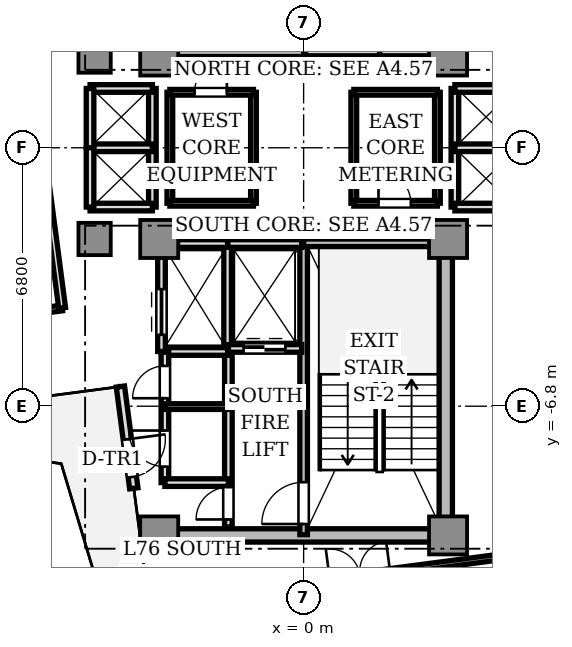
"""IFC4 building model, lengths in metres.
Left out: names, types, materials, properties, quantities, classifications, styles, units other than length and angle.
Written with IfcOpenShell. Run it as: python <this file> out.ifc"""

import sys

from ifc_helpers import new_model, si_unit, direction, frame, frame_2d, origin, origin_2d, place, context, subcontext, project, spatial, rectangle, extrude, source, transform, mapped, element, fill, save


model = new_model("IFC4")
c1 = context("Model", 3, precision=1e-05, world=origin(), true_north=direction((0.0, 1.0)))
c2 = subcontext(c1, "Body", "Model", "MODEL_VIEW")
j1 = project(units=[si_unit("LENGTHUNIT", "METRE"), si_unit("PLANEANGLEUNIT", "RADIAN")], contexts=[c1])
p1 = place(None, origin())
s1 = spatial("IfcSite", under=j1, at=p1, CompositionType="ELEMENT")
p2 = place(p1, origin())
s2 = spatial("IfcBuilding", under=s1, at=p2, CompositionType="ELEMENT")
p3 = place(p2, frame((0.0, 0.0, 272.45)))
s3 = spatial("IfcBuildingStorey", under=s2, at=p3, CompositionType="ELEMENT", Elevation=272.45)
p4 = place(p3, frame((-3.55, -10.2, 0.0), z_axis=(0.0, 0.0, 1.0), x_axis=(1.0, 0.0, 0.0)))
e1 = element("IfcWall", 1, at=p4, inside=s3, PredefinedType="SHEAR", context=c2, shape_type="SweptSolid", body=[
    extrude(rectangle(XDim=7.1, YDim=0.35, at=frame_2d((3.55, 0.0))), origin(), (0.0, 0.0, 1.0), 3.11),
])
p5 = place(p3, frame((3.74, -9.75, 0.0), z_axis=(0.0, 0.0, 1.0), x_axis=(0.0, 1.0, 0.0)))
e2 = element("IfcWall", 2, at=p5, inside=s3, PredefinedType="SHEAR", context=c2, shape_type="SweptSolid", body=[
    extrude(rectangle(XDim=6.9, YDim=0.35, at=frame_2d((3.45, 0.0))), origin(), (0.0, 0.0, 1.0), 3.11),
])
m1 = source(origin(), c2, "Body", "SweptSolid", [
    extrude(rectangle(XDim=1.0, YDim=1.0, at=origin_2d()), origin(), (0.0, 0.0, 1.0), 3.11),
])
for number, where, z_axis, x_axis in (
    (3, (-3.8, 2.4, 0.0), (0.0, 0.0, 1.0), (1.0, 0.0, 0.0)),
    (4, (3.8, 2.4, 0.0), (0.0, 0.0, 1.0), (1.0, 0.0, 0.0)),
    (5, (-3.8, -2.4, 0.0), (0.0, 0.0, 1.0), (1.0, 0.0, 0.0)),
    (6, (3.8, -2.4, 0.0), (0.0, 0.0, 1.0), (1.0, 0.0, 0.0)),
    (7, (-3.8, -10.2, 0.0), (0.0, 0.0, 1.0), (1.0, 0.0, 0.0)),
    (8, (3.8, -10.2, 0.0), (0.0, 0.0, 1.0), (1.0, 0.0, 0.0)),
):
    element("IfcColumn", number, at=place(p3, frame(where, z_axis=z_axis, x_axis=x_axis)), inside=s3, PredefinedType="COLUMN", context=c2, shape_type="MappedRepresentation", body=[
        mapped(m1, transform((0.0, 0.0, 0.0), scale=1.0)),
    ])
m2 = source(origin(), c2, "Body", "SweptSolid", [
    extrude(rectangle(XDim=0.85, YDim=0.85, at=origin_2d()), origin(), (0.0, 0.0, 1.0), 3.11),
])
for number, where, z_axis, x_axis in (
    (9, (-5.5, 2.4, 0.0), (0.0, 0.0, 1.0), (1.0, 0.0, 0.0)),
    (10, (-5.5, -2.4, 0.0), (0.0, 0.0, 1.0), (1.0, 0.0, 0.0)),
):
    element("IfcColumn", number, at=place(p3, frame(where, z_axis=z_axis, x_axis=x_axis)), inside=s3, PredefinedType="COLUMN", context=c2, shape_type="MappedRepresentation", body=[
        mapped(m2, transform((0.0, 0.0, 0.0), scale=1.0)),
    ])
p6 = place(p3, frame((-4.821, -6.283, 0.0), z_axis=(0.0, 0.0, 1.0), x_axis=(0.130475563272, -0.991451525486, 0.0)))
e11 = element("IfcWall", 11, at=p6, inside=s3, PredefinedType="STANDARD", context=c2, shape_type="SweptSolid", body=[
    extrude(rectangle(XDim=2.7, YDim=0.22, at=frame_2d((1.35, 0.0))), origin(), (0.0, 0.0, 1.0), 3.11),
])
p7 = place(p6, frame((1.4, 0.0, 0.0)))
e12 = element("IfcOpeningElement", 12, at=p7, cuts=e11, PredefinedType="OPENING", context=c2, shape_type="SweptSolid", body=[
    extrude(rectangle(XDim=1.0, YDim=2.2, at=frame_2d((0.5, 1.1))), frame((0.0, 0.12, 0.0), z_axis=(0.0, -1.0, 0.0), x_axis=(1.0, 0.0, 0.0)), (0.0, 0.0, 1.0), 0.24),
])
p8 = place(p3, frame((0.0, 2.5, 0.0), z_axis=(0.0, 0.0, 1.0), x_axis=(0.0, 1.0, 0.0)))
e13 = element("IfcWall", 13, at=p8, inside=s3, PredefinedType="SOLIDWALL", context=c2, shape_type="SweptSolid", body=[
    extrude(rectangle(XDim=7.68, YDim=0.2, at=frame_2d((3.84, 0.0))), origin(), (0.0, 0.0, 1.0), 3.11),
])
p9 = place(p8, frame((6.36, 0.0, 0.0)))
e14 = element("IfcOpeningElement", 14, at=p9, cuts=e13, PredefinedType="OPENING", context=c2, shape_type="SweptSolid", body=[
    extrude(rectangle(XDim=1.1, YDim=2.15, at=frame_2d((0.55, 1.075))), frame((0.0, 0.11, 0.0), z_axis=(0.0, -1.0, 0.0), x_axis=(1.0, 0.0, 0.0)), (0.0, 0.0, 1.0), 0.22),
])
p10 = place(p3, frame((-3.72, 2.5, 0.0), z_axis=(0.0, 0.0, 1.0), x_axis=(1.0, 0.0, 0.0)))
e15 = element("IfcWall", 15, at=p10, inside=s3, PredefinedType="SOLIDWALL", context=c2, shape_type="SweptSolid", body=[
    extrude(rectangle(XDim=3.72, YDim=0.2, at=frame_2d((1.86, 0.0))), origin(), (0.0, 0.0, 1.0), 3.11),
])
p11 = place(p3, frame((0.0, -10.18, 0.0), z_axis=(0.0, 0.0, 1.0), x_axis=(0.0, 1.0, 0.0)))
e16 = element("IfcWall", 16, at=p11, inside=s3, PredefinedType="SOLIDWALL", context=c2, shape_type="SweptSolid", body=[
    extrude(rectangle(XDim=7.68, YDim=0.2, at=frame_2d((3.84, 0.0))), origin(), (0.0, 0.0, 1.0), 3.11),
])
p12 = place(p11, frame((0.28, 0.0, 0.0)))
e17 = element("IfcOpeningElement", 17, at=p12, cuts=e16, PredefinedType="OPENING", context=c2, shape_type="SweptSolid", body=[
    extrude(rectangle(XDim=1.1, YDim=2.15, at=frame_2d((0.55, 1.075))), frame((0.0, 0.11, 0.0), z_axis=(0.0, -1.0, 0.0), x_axis=(1.0, 0.0, 0.0)), (0.0, 0.0, 1.0), 0.22),
])
p13 = place(p3, frame((0.0, -2.5, 0.0), z_axis=(0.0, 0.0, 1.0), x_axis=(1.0, 0.0, 0.0)))
e18 = element("IfcWall", 18, at=p13, inside=s3, PredefinedType="SOLIDWALL", context=c2, shape_type="SweptSolid", body=[
    extrude(rectangle(XDim=3.72, YDim=0.2, at=frame_2d((1.86, 0.0))), origin(), (0.0, 0.0, 1.0), 3.11),
])
p14 = place(p3, frame((-1.98, -9.98, 0.0), z_axis=(0.0, 0.0, 1.0), x_axis=(0.0, 1.0, 0.0)))
e19 = element("IfcWall", 19, at=p14, inside=s3, PredefinedType="SOLIDWALL", context=c2, shape_type="SweptSolid", body=[
    extrude(rectangle(XDim=4.66, YDim=0.2, at=frame_2d((2.33, 0.0))), origin(), (0.0, 0.0, 1.0), 2.66),
])
p15 = place(p14, frame((0.2, 0.0, 0.0)))
e20 = element("IfcOpeningElement", 20, at=p15, cuts=e19, PredefinedType="OPENING", context=c2, shape_type="SweptSolid", body=[
    extrude(rectangle(XDim=0.85, YDim=2.1, at=frame_2d((0.425, 1.05))), frame((0.0, 0.11, 0.0), z_axis=(0.0, -1.0, 0.0), x_axis=(1.0, 0.0, 0.0)), (0.0, 0.0, 1.0), 0.22),
])
p16 = place(p3, frame((2.0, 2.5, 0.0), z_axis=(0.0, 0.0, 1.0), x_axis=(0.0, 1.0, 0.0)))
e21 = element("IfcWall", 21, at=p16, inside=s3, PredefinedType="SOLIDWALL", context=c2, shape_type="SweptSolid", body=[
    extrude(rectangle(XDim=2.78, YDim=0.2, at=frame_2d((1.39, 0.0))), origin(), (0.0, 0.0, 1.0), 2.66),
])
p17 = place(p3, frame((0.05, 2.52, 0.0), z_axis=(0.0, 0.0, 1.0), x_axis=(1.0, 0.0, 0.0)))
e22 = element("IfcWall", 22, at=p17, inside=s3, PredefinedType="SOLIDWALL", context=c2, shape_type="SweptSolid", body=[
    extrude(rectangle(XDim=1.95, YDim=0.2, at=frame_2d((0.975, 0.0))), origin(), (0.0, 0.0, 1.0), 2.66),
])
p18 = place(p3, frame((-2.0, -5.28, 0.0), z_axis=(0.0, 0.0, 1.0), x_axis=(0.0, 1.0, 0.0)))
e23 = element("IfcWall", 23, at=p18, inside=s3, PredefinedType="SOLIDWALL", context=c2, shape_type="SweptSolid", body=[
    extrude(rectangle(XDim=2.78, YDim=0.2, at=frame_2d((1.39, 0.0))), origin(), (0.0, 0.0, 1.0), 2.66),
])
p19 = place(p3, frame((-2.0, -2.52, 0.0), z_axis=(0.0, 0.0, 1.0), x_axis=(1.0, 0.0, 0.0)))
e24 = element("IfcWall", 24, at=p19, inside=s3, PredefinedType="SOLIDWALL", context=c2, shape_type="SweptSolid", body=[
    extrude(rectangle(XDim=1.95, YDim=0.2, at=frame_2d((0.975, 0.0))), origin(), (0.0, 0.0, 1.0), 2.66),
])
p20 = place(p3, frame((-1.98, -5.28, 0.0), z_axis=(0.0, 0.0, 1.0), x_axis=(1.0, 0.0, 0.0)))
e25 = element("IfcWall", 25, at=p20, inside=s3, PredefinedType="SOLIDWALL", context=c2, shape_type="SweptSolid", body=[
    extrude(rectangle(XDim=1.93, YDim=0.2, at=frame_2d((0.965, 0.0))), origin(), (0.0, 0.0, 1.0), 2.66),
])
p21 = place(p20, frame((0.4, 0.0, 0.0)))
e26 = element("IfcOpeningElement", 26, at=p21, cuts=e25, PredefinedType="OPENING", context=c2, shape_type="SweptSolid", body=[
    extrude(rectangle(XDim=1.1, YDim=2.2, at=frame_2d((0.55, 1.1))), frame((0.0, 0.11, 0.0), z_axis=(0.0, -1.0, 0.0), x_axis=(1.0, 0.0, 0.0)), (0.0, 0.0, 1.0), 0.22),
])
for number, where, z_axis, x_axis in (
    (27, (2.0, 2.52, 0.0), (0.0, 0.0, 1.0), (1.0, 0.0, 0.0)),
    (28, (-3.32, -2.52, 0.0), (0.0, 0.0, 1.0), (1.0, 0.0, 0.0)),
):
    element("IfcWall", number, at=place(p3, frame(where, z_axis=z_axis, x_axis=x_axis)), inside=s3, PredefinedType="SOLIDWALL", context=c2, shape_type="SweptSolid", body=[
        extrude(rectangle(XDim=1.32, YDim=0.2, at=frame_2d((0.66, 0.0))), origin(), (0.0, 0.0, 1.0), 2.66),
    ])
p22 = place(p3, frame((-3.74, -5.36, 0.0), z_axis=(0.0, 0.0, 1.0), x_axis=(1.0, 0.0, 0.0)))
e29 = element("IfcWall", 29, at=p22, inside=s3, PredefinedType="SOLIDWALL", context=c2, shape_type="SweptSolid", body=[
    extrude(rectangle(XDim=1.74, YDim=0.2, at=frame_2d((0.87, 0.0))), origin(), (0.0, 0.0, 1.0), 2.66),
])
p23 = place(p3, frame((-3.74, -5.36, 0.0), z_axis=(0.0, 0.0, 1.0), x_axis=(0.0, 1.0, 0.0)))
e30 = element("IfcWall", 30, at=p23, inside=s3, PredefinedType="SOLIDWALL", context=c2, shape_type="SweptSolid", body=[
    extrude(rectangle(XDim=2.48, YDim=0.2, at=frame_2d((1.24, 0.0))), origin(), (0.0, 0.0, 1.0), 2.66),
])
p24 = place(p23, frame((0.44, 0.0, 0.0)))
e31 = element("IfcOpeningElement", 31, at=p24, cuts=e30, PredefinedType="OPENING", context=c2, shape_type="SweptSolid", body=[
    extrude(rectangle(XDim=1.2, YDim=2.2, at=frame_2d((0.6, 1.1))), frame((0.0, 0.11, 0.0), z_axis=(0.0, -1.0, 0.0), x_axis=(1.0, 0.0, 0.0)), (0.0, 0.0, 1.0), 0.22),
])
p25 = place(p3, frame((3.98, -1.56, 0.0), z_axis=(0.0, 0.0, 1.0), x_axis=(0.0, 1.0, 0.0)))
e32 = element("IfcWall", 32, at=p25, inside=s3, PredefinedType="SOLIDWALL", context=c2, shape_type="SweptSolid", body=[
    extrude(rectangle(XDim=3.12, YDim=0.2, at=frame_2d((1.56, 0.0))), origin(), (0.0, 0.0, 1.0), 2.33),
])
for number, where, z_axis, x_axis in (
    (33, (3.98, 1.56, 0.0), (0.0, 0.0, 1.0), (1.0, 0.0, 0.0)),
    (34, (3.98, -1.56, 0.0), (0.0, 0.0, 1.0), (1.0, 0.0, 0.0)),
    (35, (3.98, 0.0, 0.0), (0.0, 0.0, 1.0), (1.0, 0.0, 0.0)),
):
    element("IfcWall", number, at=place(p3, frame(where, z_axis=z_axis, x_axis=x_axis)), inside=s3, PredefinedType="SOLIDWALL", context=c2, shape_type="SweptSolid", body=[
        extrude(rectangle(XDim=1.64, YDim=0.2, at=frame_2d((0.82, 0.0))), origin(), (0.0, 0.0, 1.0), 2.66),
    ])
p26 = place(p3, frame((-3.98, -1.56, 0.0), z_axis=(0.0, 0.0, 1.0), x_axis=(0.0, 1.0, 0.0)))
e36 = element("IfcWall", 36, at=p26, inside=s3, PredefinedType="SOLIDWALL", context=c2, shape_type="SweptSolid", body=[
    extrude(rectangle(XDim=3.12, YDim=0.2, at=frame_2d((1.56, 0.0))), origin(), (0.0, 0.0, 1.0), 2.33),
])
for number, where, z_axis, x_axis in (
    (37, (-5.62, 1.56, 0.0), (0.0, 0.0, 1.0), (1.0, 0.0, 0.0)),
    (38, (-5.62, -1.56, 0.0), (0.0, 0.0, 1.0), (1.0, 0.0, 0.0)),
    (39, (-5.62, 0.0, 0.0), (0.0, 0.0, 1.0), (1.0, 0.0, 0.0)),
):
    element("IfcWall", number, at=place(p3, frame(where, z_axis=z_axis, x_axis=x_axis)), inside=s3, PredefinedType="SOLIDWALL", context=c2, shape_type="SweptSolid", body=[
        extrude(rectangle(XDim=1.64, YDim=0.2, at=frame_2d((0.82, 0.0))), origin(), (0.0, 0.0, 1.0), 2.66),
    ])
for number, where, z_axis, x_axis in (
    (40, (-5.62, 0.0, 0.0), (0.0, 0.0, 1.0), (0.0, 1.0, 0.0)),
    (41, (-5.62, -1.56, 0.0), (0.0, 0.0, 1.0), (0.0, 1.0, 0.0)),
):
    element("IfcWall", number, at=place(p3, frame(where, z_axis=z_axis, x_axis=x_axis)), inside=s3, PredefinedType="SOLIDWALL", context=c2, shape_type="SweptSolid", body=[
        extrude(rectangle(XDim=1.56, YDim=0.2, at=frame_2d((0.78, 0.0))), origin(), (0.0, 0.0, 1.0), 2.66),
    ])
p27 = place(p3, frame((-3.65, -8.81, 0.0), z_axis=(0.0, 0.0, 1.0), x_axis=(0.0, 1.0, 0.0)))
e42 = element("IfcWall", 42, at=p27, inside=s3, PredefinedType="SOLIDWALL", context=c2, shape_type="SweptSolid", body=[
    extrude(rectangle(XDim=3.43, YDim=0.2, at=frame_2d((1.715, 0.0))), origin(), (0.0, 0.0, 1.0), 2.66),
])
p28 = place(p27, frame((0.42, 0.0, 0.0)))
e43 = element("IfcOpeningElement", 43, at=p28, cuts=e42, PredefinedType="OPENING", context=c2, shape_type="SweptSolid", body=[
    extrude(rectangle(XDim=0.95, YDim=2.15, at=frame_2d((0.475, 1.075))), frame((0.0, 0.11, 0.0), z_axis=(0.0, -1.0, 0.0), x_axis=(1.0, 0.0, 0.0)), (0.0, 0.0, 1.0), 0.22),
])
p29 = place(p27, frame((2.22, 0.0, 0.0)))
e44 = element("IfcOpeningElement", 44, at=p29, cuts=e42, PredefinedType="OPENING", context=c2, shape_type="SweptSolid", body=[
    extrude(rectangle(XDim=0.85, YDim=2.1, at=frame_2d((0.425, 1.05))), frame((0.0, 0.11, 0.0), z_axis=(0.0, -1.0, 0.0), x_axis=(1.0, 0.0, 0.0)), (0.0, 0.0, 1.0), 0.22),
])
p30 = place(p3, frame((-3.65, -8.81, 0.0), z_axis=(0.0, 0.0, 1.0), x_axis=(1.0, 0.0, 0.0)))
e45 = element("IfcWall", 45, at=p30, inside=s3, PredefinedType="SOLIDWALL", context=c2, shape_type="SweptSolid", body=[
    extrude(rectangle(XDim=1.67, YDim=0.2, at=frame_2d((0.835, 0.0))), origin(), (0.0, 0.0, 1.0), 2.66),
])
p31 = place(p3, frame((-3.65, -6.81, 0.0), z_axis=(0.0, 0.0, 1.0), x_axis=(1.0, 0.0, 0.0)))
e46 = element("IfcWall", 46, at=p31, inside=s3, PredefinedType="PARTITIONING", context=c2, shape_type="SweptSolid", body=[
    extrude(rectangle(XDim=1.67, YDim=0.15, at=frame_2d((0.835, 0.0))), origin(), (0.0, 0.0, 1.0), 2.66),
])
p32 = place(p3, frame((-1.32, -1.46, 0.0), z_axis=(0.0, 0.0, 1.0), x_axis=(0.0, 1.0, 0.0)))
e47 = element("IfcWall", 47, at=p32, inside=s3, PredefinedType="PARTITIONING", context=c2, shape_type="SweptSolid", body=[
    extrude(rectangle(XDim=2.92, YDim=0.15, at=frame_2d((1.46, 0.0))), origin(), (0.0, 0.0, 1.0), 2.66),
])
p33 = place(p3, frame((-3.52, -1.46, 0.0), z_axis=(0.0, 0.0, 1.0), x_axis=(0.0, 1.0, 0.0)))
e48 = element("IfcWall", 48, at=p33, inside=s3, PredefinedType="PARTITIONING", context=c2, shape_type="SweptSolid", body=[
    extrude(rectangle(XDim=2.92, YDim=0.15, at=frame_2d((1.46, 0.0))), origin(), (0.0, 0.0, 1.0), 2.33),
])
p34 = place(p3, frame((-3.52, 1.46, 0.0), z_axis=(0.0, 0.0, 1.0), x_axis=(1.0, 0.0, 0.0)))
e49 = element("IfcWall", 49, at=p34, inside=s3, PredefinedType="PARTITIONING", context=c2, shape_type="SweptSolid", body=[
    extrude(rectangle(XDim=2.2, YDim=0.15, at=frame_2d((1.1, 0.0))), origin(), (0.0, 0.0, 1.0), 2.66),
])
p35 = place(p34, frame((0.65, 0.0, 0.0)))
e50 = element("IfcOpeningElement", 50, at=p35, cuts=e49, PredefinedType="OPENING", context=c2, shape_type="SweptSolid", body=[
    extrude(rectangle(XDim=0.85, YDim=2.1, at=frame_2d((0.425, 1.05))), frame((0.0, 0.085, 0.0), z_axis=(0.0, -1.0, 0.0), x_axis=(1.0, 0.0, 0.0)), (0.0, 0.0, 1.0), 0.17),
])
p36 = place(p3, frame((-3.52, -1.46, 0.0), z_axis=(0.0, 0.0, 1.0), x_axis=(1.0, 0.0, 0.0)))
e51 = element("IfcWall", 51, at=p36, inside=s3, PredefinedType="PARTITIONING", context=c2, shape_type="SweptSolid", body=[
    extrude(rectangle(XDim=2.2, YDim=0.15, at=frame_2d((1.1, 0.0))), origin(), (0.0, 0.0, 1.0), 2.66),
])
p37 = place(p3, frame((1.32, -1.46, 0.0), z_axis=(0.0, 0.0, 1.0), x_axis=(0.0, 1.0, 0.0)))
e52 = element("IfcWall", 52, at=p37, inside=s3, PredefinedType="PARTITIONING", context=c2, shape_type="SweptSolid", body=[
    extrude(rectangle(XDim=2.92, YDim=0.15, at=frame_2d((1.46, 0.0))), origin(), (0.0, 0.0, 1.0), 2.66),
])
p38 = place(p3, frame((3.52, -1.46, 0.0), z_axis=(0.0, 0.0, 1.0), x_axis=(0.0, 1.0, 0.0)))
e53 = element("IfcWall", 53, at=p38, inside=s3, PredefinedType="PARTITIONING", context=c2, shape_type="SweptSolid", body=[
    extrude(rectangle(XDim=2.92, YDim=0.15, at=frame_2d((1.46, 0.0))), origin(), (0.0, 0.0, 1.0), 2.33),
])
p39 = place(p3, frame((1.32, 1.46, 0.0), z_axis=(0.0, 0.0, 1.0), x_axis=(1.0, 0.0, 0.0)))
e54 = element("IfcWall", 54, at=p39, inside=s3, PredefinedType="PARTITIONING", context=c2, shape_type="SweptSolid", body=[
    extrude(rectangle(XDim=2.2, YDim=0.15, at=frame_2d((1.1, 0.0))), origin(), (0.0, 0.0, 1.0), 2.66),
])
p40 = place(p3, frame((1.32, -1.46, 0.0), z_axis=(0.0, 0.0, 1.0), x_axis=(1.0, 0.0, 0.0)))
e55 = element("IfcWall", 55, at=p40, inside=s3, PredefinedType="PARTITIONING", context=c2, shape_type="SweptSolid", body=[
    extrude(rectangle(XDim=2.2, YDim=0.15, at=frame_2d((1.1, 0.0))), origin(), (0.0, 0.0, 1.0), 2.66),
])
p41 = place(p40, frame((0.65, 0.0, 0.0)))
e56 = element("IfcOpeningElement", 56, at=p41, cuts=e55, PredefinedType="OPENING", context=c2, shape_type="SweptSolid", body=[
    extrude(rectangle(XDim=0.85, YDim=2.1, at=frame_2d((0.425, 1.05))), frame((0.0, 0.085, 0.0), z_axis=(0.0, -1.0, 0.0), x_axis=(1.0, 0.0, 0.0)), (0.0, 0.0, 1.0), 0.17),
])
p42 = place(p3, frame((-6.354, -4.215, 0.0), z_axis=(0.0, 0.0, 1.0), x_axis=(-0.991441861772, -0.130548974432, 0.0)))
e57 = element("IfcWall", 57, at=p42, inside=s3, PredefinedType="PARTITIONING", context=c2, shape_type="SweptSolid", body=[
    extrude(rectangle(XDim=8.29, YDim=0.15, at=frame_2d((4.145, 0.0))), origin(), (0.0, 0.0, 1.0), 2.66),
])
p43 = place(p42, frame((1.431, 0.0, 0.0)))
e58 = element("IfcOpeningElement", 58, at=p43, cuts=e57, PredefinedType="OPENING", context=c2, shape_type="SweptSolid", body=[
    extrude(rectangle(XDim=0.85, YDim=2.1, at=frame_2d((0.425, 1.05))), frame((0.0, 0.085, 0.0), z_axis=(0.0, -1.0, 0.0), x_axis=(1.0, 0.0, 0.0)), (0.0, 0.0, 1.0), 0.17),
])
p44 = place(p42, frame((4.602, 0.0, 0.0)))
e59 = element("IfcOpeningElement", 59, at=p44, cuts=e57, PredefinedType="OPENING", context=c2, shape_type="SweptSolid", body=[
    extrude(rectangle(XDim=0.85, YDim=2.1, at=frame_2d((0.425, 1.05))), frame((0.0, 0.085, 0.0), z_axis=(0.0, -1.0, 0.0), x_axis=(1.0, 0.0, 0.0)), (0.0, 0.0, 1.0), 0.17),
])
p45 = place(p3, frame((-7.516, 4.608, 0.0), z_axis=(0.0, 0.0, 1.0), x_axis=(0.130548179903, -0.991441966392, 0.0)))
e60 = element("IfcWall", 60, at=p45, inside=s3, PredefinedType="PARTITIONING", context=c2, shape_type="SweptSolid", body=[
    extrude(rectangle(XDim=8.9, YDim=0.18, at=frame_2d((4.45, 0.0))), origin(), (0.0, 0.0, 1.0), 2.66),
])
p46 = place(p3, frame((-4.021, -11.977, 0.0), z_axis=(0.0, 0.0, 1.0), x_axis=(0.991445908749, 0.130518236368, 0.0)))
e61 = element("IfcWall", 61, at=p46, inside=s3, PredefinedType="PARTITIONING", context=c2, shape_type="SweptSolid", body=[
    extrude(rectangle(XDim=11.1, YDim=0.15, at=frame_2d((5.55, 0.0))), origin(), (0.0, 0.0, 1.0), 2.66),
])
p47 = place(p46, frame((4.75, 0.0, 0.0)))
e62 = element("IfcOpeningElement", 62, at=p47, cuts=e61, PredefinedType="OPENING", context=c2, shape_type="SweptSolid", body=[
    extrude(rectangle(XDim=1.6, YDim=2.25, at=frame_2d((0.8, 1.125))), frame((0.0, 0.085, 0.0), z_axis=(0.0, -1.0, 0.0), x_axis=(1.0, 0.0, 0.0)), (0.0, 0.0, 1.0), 0.17),
])
m3 = source(origin(), c2, "Body", "SweptSolid", [
    extrude(rectangle(XDim=1.0, YDim=0.05, at=origin_2d()), origin(), (0.0, 0.0, 1.0), 2.2),
])
p48 = place(p7, frame((0.5, 0.0, 0.0)))
e63 = element("IfcDoor", 63, at=p48, inside=s3, OperationType="SINGLE_SWING_LEFT", PredefinedType="DOOR", context=c2, shape_type="MappedRepresentation", body=[
    mapped(m3, transform((0.0, 0.0, 0.0), scale=1.0)),
])
fill(e12, e63)
m4 = source(origin(), c2, "Body", "SweptSolid", [
    extrude(rectangle(XDim=1.1, YDim=0.05, at=origin_2d()), origin(), (0.0, 0.0, 1.0), 2.15),
])
p49 = place(p12, frame((0.55, 0.0, 0.0)))
e64 = element("IfcDoor", 64, at=p49, inside=s3, OperationType="SINGLE_SWING_LEFT", PredefinedType="DOOR", context=c2, shape_type="MappedRepresentation", body=[
    mapped(m4, transform((0.0, 0.0, 0.0), scale=1.0)),
])
fill(e17, e64)
m5 = source(origin(), c2, "Body", "SweptSolid", [
    extrude(rectangle(XDim=0.85, YDim=0.05, at=origin_2d()), origin(), (0.0, 0.0, 1.0), 2.1),
])
p50 = place(p15, frame((0.425, 0.0, 0.0)))
e65 = element("IfcDoor", 65, at=p50, inside=s3, OperationType="SINGLE_SWING_LEFT", PredefinedType="DOOR", context=c2, shape_type="MappedRepresentation", body=[
    mapped(m5, transform((0.0, 0.0, 0.0), scale=1.0)),
])
fill(e20, e65)
m6 = source(origin(), c2, "Body", "SweptSolid", [
    extrude(rectangle(XDim=1.1, YDim=0.05, at=origin_2d()), origin(), (0.0, 0.0, 1.0), 2.2),
])
p51 = place(p21, frame((0.55, 0.0, 0.0)))
e66 = element("IfcDoor", 66, at=p51, inside=s3, OperationType="DOUBLE_DOOR_SLIDING", PredefinedType="DOOR", context=c2, shape_type="MappedRepresentation", body=[
    mapped(m6, transform((0.0, 0.0, 0.0), scale=1.0)),
])
fill(e26, e66)
m7 = source(origin(), c2, "Body", "SweptSolid", [
    extrude(rectangle(XDim=1.2, YDim=0.05, at=origin_2d()), origin(), (0.0, 0.0, 1.0), 2.2),
])
p52 = place(p24, frame((0.6, 0.0, 0.0)))
e67 = element("IfcDoor", 67, at=p52, inside=s3, OperationType="DOUBLE_DOOR_SLIDING", PredefinedType="DOOR", context=c2, shape_type="MappedRepresentation", body=[
    mapped(m7, transform((0.0, 0.0, 0.0), scale=1.0)),
])
fill(e31, e67)
m8 = source(origin(), c2, "Body", "SweptSolid", [
    extrude(rectangle(XDim=0.95, YDim=0.05, at=origin_2d()), origin(), (0.0, 0.0, 1.0), 2.15),
])
p53 = place(p28, frame((0.475, 0.0, 0.0)))
e68 = element("IfcDoor", 68, at=p53, inside=s3, OperationType="SINGLE_SWING_RIGHT", PredefinedType="DOOR", context=c2, shape_type="MappedRepresentation", body=[
    mapped(m8, transform((0.0, 0.0, 0.0), scale=1.0)),
])
fill(e43, e68)
p54 = place(p29, frame((0.425, 0.0, 0.0)))
e69 = element("IfcDoor", 69, at=p54, inside=s3, OperationType="SINGLE_SWING_LEFT", PredefinedType="DOOR", context=c2, shape_type="MappedRepresentation", body=[
    mapped(m5, transform((0.0, 0.0, 0.0), scale=1.0)),
])
fill(e44, e69)
p55 = place(p35, frame((0.425, 0.0, 0.0)))
e70 = element("IfcDoor", 70, at=p55, inside=s3, OperationType="SINGLE_SWING_RIGHT", PredefinedType="DOOR", context=c2, shape_type="MappedRepresentation", body=[
    mapped(m5, transform((0.0, 0.0, 0.0), scale=1.0)),
])
fill(e50, e70)
p56 = place(p41, frame((0.425, 0.0, 0.0)))
e71 = element("IfcDoor", 71, at=p56, inside=s3, OperationType="SINGLE_SWING_LEFT", PredefinedType="DOOR", context=c2, shape_type="MappedRepresentation", body=[
    mapped(m5, transform((0.0, 0.0, 0.0), scale=1.0)),
])
fill(e56, e71)
save(model, sys.argv[1])
